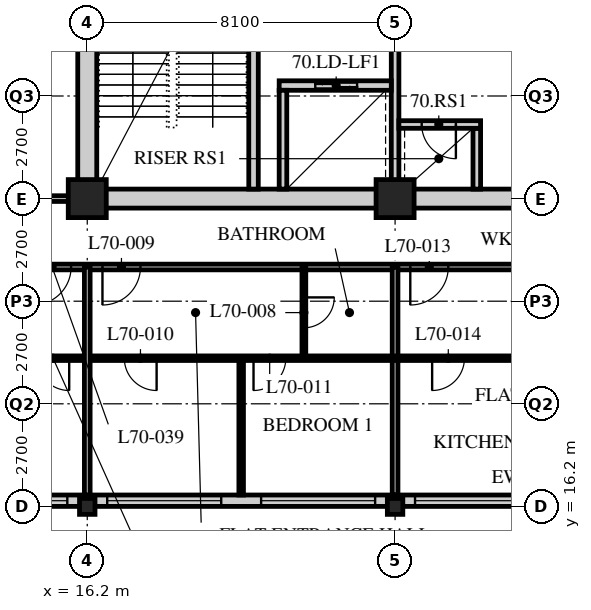
"""IFC4 building model, lengths in metres.
Left out: names, types, materials, properties, quantities, classifications, styles, units other than length and angle.
Written with IfcOpenShell. Run it as: python <this file> out.ifc"""

import sys

from ifc_helpers import new_model, si_unit, direction, frame, frame_2d, origin, origin_2d, place, context, subcontext, project, spatial, rectangle, hollow_rectangle, i_section, extrude, element, fill, save


model = new_model("IFC4")
c1 = context("Model", 3, precision=1e-05, world=origin(), true_north=direction((0.0, 1.0)))
c2 = subcontext(c1, "Body", "Model", "MODEL_VIEW")
j1 = project(units=[si_unit("LENGTHUNIT", "METRE"), si_unit("PLANEANGLEUNIT", "RADIAN")], contexts=[c1])
p1 = place(None, origin())
s1 = spatial("IfcSite", under=j1, at=p1, CompositionType="ELEMENT")
p2 = place(p1, origin())
s2 = spatial("IfcBuilding", under=s1, at=p2, CompositionType="ELEMENT")
p3 = place(p2, frame((0.0, 0.0, 273.6)))
s3 = spatial("IfcBuildingStorey", under=s2, at=p3, CompositionType="ELEMENT", Elevation=273.6)
p4 = place(p3, frame((16.2, 16.2, 0.0), z_axis=(0.0, 0.0, 1.0), x_axis=(1.0, 0.0, 0.0)))
e1 = element("IfcColumn", 1, at=p4, inside=s3, PredefinedType="COLUMN", context=c2, shape_type="SweptSolid", body=[
    extrude(i_section(OverallWidth=0.407, OverallDepth=0.419, WebThickness=0.031, FlangeThickness=0.049, FilletRadius=0.015, at=origin_2d()), origin(), (0.0, 0.0, 1.0), 3.9),
])
p5 = place(p3, frame((16.2, 24.3, 0.0), z_axis=(0.0, 0.0, 1.0), x_axis=(1.0, 0.0, 0.0)))
e2 = element("IfcColumn", 2, at=p5, inside=s3, PredefinedType="COLUMN", context=c2, shape_type="SweptSolid", body=[
    extrude(hollow_rectangle(XDim=1.0, YDim=1.0, WallThickness=0.1, at=origin_2d()), origin(), (0.0, 0.0, 1.0), 3.9),
])
p6 = place(p3, frame((24.3, 16.2, 0.0), z_axis=(0.0, 0.0, 1.0), x_axis=(1.0, 0.0, 0.0)))
e3 = element("IfcColumn", 3, at=p6, inside=s3, PredefinedType="COLUMN", context=c2, shape_type="SweptSolid", body=[
    extrude(i_section(OverallWidth=0.407, OverallDepth=0.419, WebThickness=0.031, FlangeThickness=0.049, FilletRadius=0.015, at=origin_2d()), origin(), (0.0, 0.0, 1.0), 3.9),
])
p7 = place(p3, frame((24.3, 24.3, 0.0), z_axis=(0.0, 0.0, 1.0), x_axis=(1.0, 0.0, 0.0)))
e4 = element("IfcColumn", 4, at=p7, inside=s3, PredefinedType="COLUMN", context=c2, shape_type="SweptSolid", body=[
    extrude(hollow_rectangle(XDim=1.0, YDim=1.0, WallThickness=0.1, at=origin_2d()), origin(), (0.0, 0.0, 1.0), 3.9),
])
p8 = place(p3, frame((8.4, 16.35, 0.0), z_axis=(0.0, 0.0, 1.0), x_axis=(1.0, 0.0, 0.0)))
e5 = element("IfcWall", 5, at=p8, inside=s3, PredefinedType="SOLIDWALL", context=c2, shape_type="SweptSolid", body=[
    extrude(rectangle(XDim=40.2, YDim=0.3, at=frame_2d((20.1, 0.0))), origin(), (0.0, 0.0, 1.0), 3.69),
])
p9 = place(p8, frame((0.225, 0.0, 0.6)))
e6 = element("IfcOpeningElement", 6, at=p9, cuts=e5, PredefinedType="OPENING", context=c2, shape_type="SweptSolid", body=[
    extrude(rectangle(XDim=3.0, YDim=2.4, at=frame_2d((1.5, 1.2))), frame((0.0, 0.16, 0.0), z_axis=(0.0, -1.0, 0.0), x_axis=(1.0, 0.0, 0.0)), (0.0, 0.0, 1.0), 0.32),
])
p10 = place(p8, frame((4.275, 0.0, 0.6)))
e7 = element("IfcOpeningElement", 7, at=p10, cuts=e5, PredefinedType="OPENING", context=c2, shape_type="SweptSolid", body=[
    extrude(rectangle(XDim=3.0, YDim=2.4, at=frame_2d((1.5, 1.2))), frame((0.0, 0.16, 0.0), z_axis=(0.0, -1.0, 0.0), x_axis=(1.0, 0.0, 0.0)), (0.0, 0.0, 1.0), 0.32),
])
p11 = place(p8, frame((8.325, 0.0, 0.6)))
e8 = element("IfcOpeningElement", 8, at=p11, cuts=e5, PredefinedType="OPENING", context=c2, shape_type="SweptSolid", body=[
    extrude(rectangle(XDim=3.0, YDim=2.4, at=frame_2d((1.5, 1.2))), frame((0.0, 0.16, 0.0), z_axis=(0.0, -1.0, 0.0), x_axis=(1.0, 0.0, 0.0)), (0.0, 0.0, 1.0), 0.32),
])
p12 = place(p8, frame((12.375, 0.0, 0.6)))
e9 = element("IfcOpeningElement", 9, at=p12, cuts=e5, PredefinedType="OPENING", context=c2, shape_type="SweptSolid", body=[
    extrude(rectangle(XDim=3.0, YDim=2.4, at=frame_2d((1.5, 1.2))), frame((0.0, 0.16, 0.0), z_axis=(0.0, -1.0, 0.0), x_axis=(1.0, 0.0, 0.0)), (0.0, 0.0, 1.0), 0.32),
])
p13 = place(p8, frame((16.425, 0.0, 0.6)))
e10 = element("IfcOpeningElement", 10, at=p13, cuts=e5, PredefinedType="OPENING", context=c2, shape_type="SweptSolid", body=[
    extrude(rectangle(XDim=3.0, YDim=2.4, at=frame_2d((1.5, 1.2))), frame((0.0, 0.16, 0.0), z_axis=(0.0, -1.0, 0.0), x_axis=(1.0, 0.0, 0.0)), (0.0, 0.0, 1.0), 0.32),
])
p14 = place(p8, frame((20.475, 0.0, 0.6)))
e11 = element("IfcOpeningElement", 11, at=p14, cuts=e5, PredefinedType="OPENING", context=c2, shape_type="SweptSolid", body=[
    extrude(rectangle(XDim=3.0, YDim=2.4, at=frame_2d((1.5, 1.2))), frame((0.0, 0.16, 0.0), z_axis=(0.0, -1.0, 0.0), x_axis=(1.0, 0.0, 0.0)), (0.0, 0.0, 1.0), 0.32),
])
p15 = place(p8, frame((24.525, 0.0, 0.6)))
e12 = element("IfcOpeningElement", 12, at=p15, cuts=e5, PredefinedType="OPENING", context=c2, shape_type="SweptSolid", body=[
    extrude(rectangle(XDim=3.0, YDim=2.4, at=frame_2d((1.5, 1.2))), frame((0.0, 0.16, 0.0), z_axis=(0.0, -1.0, 0.0), x_axis=(1.0, 0.0, 0.0)), (0.0, 0.0, 1.0), 0.32),
])
p16 = place(p8, frame((28.575, 0.0, 0.6)))
e13 = element("IfcOpeningElement", 13, at=p16, cuts=e5, PredefinedType="OPENING", context=c2, shape_type="SweptSolid", body=[
    extrude(rectangle(XDim=3.0, YDim=2.4, at=frame_2d((1.5, 1.2))), frame((0.0, 0.16, 0.0), z_axis=(0.0, -1.0, 0.0), x_axis=(1.0, 0.0, 0.0)), (0.0, 0.0, 1.0), 0.32),
])
p17 = place(p8, frame((32.625, 0.0, 0.6)))
e14 = element("IfcOpeningElement", 14, at=p17, cuts=e5, PredefinedType="OPENING", context=c2, shape_type="SweptSolid", body=[
    extrude(rectangle(XDim=3.0, YDim=2.4, at=frame_2d((1.5, 1.2))), frame((0.0, 0.16, 0.0), z_axis=(0.0, -1.0, 0.0), x_axis=(1.0, 0.0, 0.0)), (0.0, 0.0, 1.0), 0.32),
])
p18 = place(p8, frame((36.675, 0.0, 0.6)))
e15 = element("IfcOpeningElement", 15, at=p18, cuts=e5, PredefinedType="OPENING", context=c2, shape_type="SweptSolid", body=[
    extrude(rectangle(XDim=3.0, YDim=2.4, at=frame_2d((1.5, 1.2))), frame((0.0, 0.16, 0.0), z_axis=(0.0, -1.0, 0.0), x_axis=(1.0, 0.0, 0.0)), (0.0, 0.0, 1.0), 0.32),
])
p19 = place(p3, frame((12.15, 22.5, 0.0), z_axis=(0.0, 0.0, 1.0), x_axis=(1.0, 0.0, 0.0)))
e16 = element("IfcWall", 16, at=p19, inside=s3, PredefinedType="PARTITIONING", context=c2, shape_type="SweptSolid", body=[
    extrude(rectangle(XDim=24.3, YDim=0.15, at=frame_2d((12.15, 0.0))), origin(), (0.0, 0.0, 1.0), 3.69),
])
p20 = place(p19, frame((4.45, 0.0, 0.0)))
e17 = element("IfcOpeningElement", 17, at=p20, cuts=e16, PredefinedType="OPENING", context=c2, shape_type="SweptSolid", body=[
    extrude(rectangle(XDim=1.0, YDim=2.1, at=frame_2d((0.5, 1.05))), frame((0.0, 0.085, 0.0), z_axis=(0.0, -1.0, 0.0), x_axis=(1.0, 0.0, 0.0)), (0.0, 0.0, 1.0), 0.17),
])
p21 = place(p19, frame((12.55, 0.0, 0.0)))
e18 = element("IfcOpeningElement", 18, at=p21, cuts=e16, PredefinedType="OPENING", context=c2, shape_type="SweptSolid", body=[
    extrude(rectangle(XDim=1.0, YDim=2.1, at=frame_2d((0.5, 1.05))), frame((0.0, 0.085, 0.0), z_axis=(0.0, -1.0, 0.0), x_axis=(1.0, 0.0, 0.0)), (0.0, 0.0, 1.0), 0.17),
])
p22 = place(p19, frame((2.625, 0.0, 0.0)))
e19 = element("IfcOpeningElement", 19, at=p22, cuts=e16, PredefinedType="OPENING", context=c2, shape_type="SweptSolid", body=[
    extrude(rectangle(XDim=1.0, YDim=2.1, at=frame_2d((0.5, 1.05))), frame((0.0, 0.085, 0.0), z_axis=(0.0, -1.0, 0.0), x_axis=(1.0, 0.0, 0.0)), (0.0, 0.0, 1.0), 0.17),
])
p23 = place(p3, frame((16.0, 24.3, 0.0), z_axis=(0.0, 0.0, 1.0), x_axis=(-1.0, 0.0, 0.0)))
e20 = element("IfcWall", 20, at=p23, inside=s3, PredefinedType="PARTITIONING", context=c2, shape_type="SweptSolid", body=[
    extrude(rectangle(XDim=2.05, YDim=0.15, at=frame_2d((1.025, 0.0))), origin(), (0.0, 0.0, 1.0), 3.078),
])
p24 = place(p3, frame((21.9, 22.5, 0.0), z_axis=(0.0, 0.0, 1.0), x_axis=(0.0, -1.0, 0.0)))
e21 = element("IfcWall", 21, at=p24, inside=s3, PredefinedType="PARTITIONING", context=c2, shape_type="SweptSolid", body=[
    extrude(rectangle(XDim=2.4, YDim=0.1, at=frame_2d((1.2, 0.0))), origin(), (0.0, 0.0, 1.0), 3.69),
])
p25 = place(p24, frame((0.8, 0.0, 0.0)))
e22 = element("IfcOpeningElement", 22, at=p25, cuts=e21, PredefinedType="OPENING", context=c2, shape_type="SweptSolid", body=[
    extrude(rectangle(XDim=0.8, YDim=2.1, at=frame_2d((0.4, 1.05))), frame((0.0, 0.06, 0.0), z_axis=(0.0, -1.0, 0.0), x_axis=(1.0, 0.0, 0.0)), (0.0, 0.0, 1.0), 0.12),
])
p26 = place(p3, frame((20.25, 20.1, 0.0), z_axis=(0.0, 0.0, 1.0), x_axis=(0.0, -1.0, 0.0)))
e23 = element("IfcWall", 23, at=p26, inside=s3, PredefinedType="PARTITIONING", context=c2, shape_type="SweptSolid", body=[
    extrude(rectangle(XDim=3.6, YDim=0.12, at=frame_2d((1.8, 0.0))), origin(), (0.0, 0.0, 1.0), 3.69),
])
p27 = place(p3, frame((24.3, 22.5, 0.0), z_axis=(0.0, 0.0, 1.0), x_axis=(0.0, -1.0, 0.0)))
e24 = element("IfcWall", 24, at=p27, inside=s3, PredefinedType="PARTITIONING", context=c2, shape_type="SweptSolid", body=[
    extrude(rectangle(XDim=6.0, YDim=0.15, at=frame_2d((3.0, 0.0))), origin(), (0.0, 0.0, 1.0), 3.078),
])
p28 = place(p3, frame((12.15, 20.1, 0.0), z_axis=(0.0, 0.0, 1.0), x_axis=(1.0, 0.0, 0.0)))
e25 = element("IfcWall", 25, at=p28, inside=s3, PredefinedType="PARTITIONING", context=c2, shape_type="SweptSolid", body=[
    extrude(rectangle(XDim=24.3, YDim=0.12, at=frame_2d((12.15, 0.0))), origin(), (0.0, 0.0, 1.0), 3.69),
])
p29 = place(p28, frame((5.025, 0.0, 0.0)))
e26 = element("IfcOpeningElement", 26, at=p29, cuts=e25, PredefinedType="OPENING", context=c2, shape_type="SweptSolid", body=[
    extrude(rectangle(XDim=0.85, YDim=2.1, at=frame_2d((0.425, 1.05))), frame((0.0, 0.07, 0.0), z_axis=(0.0, -1.0, 0.0), x_axis=(1.0, 0.0, 0.0)), (0.0, 0.0, 1.0), 0.14),
])
p30 = place(p28, frame((8.425, 0.0, 0.0)))
e27 = element("IfcOpeningElement", 27, at=p30, cuts=e25, PredefinedType="OPENING", context=c2, shape_type="SweptSolid", body=[
    extrude(rectangle(XDim=0.85, YDim=2.1, at=frame_2d((0.425, 1.05))), frame((0.0, 0.07, 0.0), z_axis=(0.0, -1.0, 0.0), x_axis=(1.0, 0.0, 0.0)), (0.0, 0.0, 1.0), 0.14),
])
p31 = place(p28, frame((13.125, 0.0, 0.0)))
e28 = element("IfcOpeningElement", 28, at=p31, cuts=e25, PredefinedType="OPENING", context=c2, shape_type="SweptSolid", body=[
    extrude(rectangle(XDim=0.85, YDim=2.1, at=frame_2d((0.425, 1.05))), frame((0.0, 0.07, 0.0), z_axis=(0.0, -1.0, 0.0), x_axis=(1.0, 0.0, 0.0)), (0.0, 0.0, 1.0), 0.14),
])
p32 = place(p28, frame((20.575, 0.0, 0.0)))
e29 = element("IfcOpeningElement", 29, at=p32, cuts=e25, PredefinedType="OPENING", context=c2, shape_type="SweptSolid", body=[
    extrude(rectangle(XDim=0.85, YDim=2.1, at=frame_2d((0.425, 1.05))), frame((0.0, 0.07, 0.0), z_axis=(0.0, -1.0, 0.0), x_axis=(1.0, 0.0, 0.0)), (0.0, 0.0, 1.0), 0.14),
])
p33 = place(p28, frame((2.725, 0.0, 0.0)))
e30 = element("IfcOpeningElement", 30, at=p33, cuts=e25, PredefinedType="OPENING", context=c2, shape_type="SweptSolid", body=[
    extrude(rectangle(XDim=0.85, YDim=2.1, at=frame_2d((0.425, 1.05))), frame((0.0, 0.07, 0.0), z_axis=(0.0, -1.0, 0.0), x_axis=(1.0, 0.0, 0.0)), (0.0, 0.0, 1.0), 0.14),
])
p34 = place(p3, frame((16.2, 22.5, 0.0), z_axis=(0.0, 0.0, 1.0), x_axis=(0.0, -1.0, 0.0)))
e31 = element("IfcWall", 31, at=p34, inside=s3, PredefinedType="PARTITIONING", context=c2, shape_type="SweptSolid", body=[
    extrude(rectangle(XDim=6.0, YDim=0.15, at=frame_2d((3.0, 0.0))), origin(), (0.0, 0.0, 1.0), 3.078),
])
p35 = place(p3, frame((15.95, 24.3, 0.0), z_axis=(0.0, 0.0, 1.0), x_axis=(1.0, 0.0, 0.0)))
e32 = element("IfcWall", 32, at=p35, inside=s3, PredefinedType="SOLIDWALL", context=c2, shape_type="SweptSolid", body=[
    extrude(rectangle(XDim=24.55, YDim=0.5, at=frame_2d((12.275, 0.0))), origin(), (0.0, 0.0, 1.0), 3.04),
])
p36 = place(p35, frame((11.5, 0.0, 0.0)))
e33 = element("IfcOpeningElement", 33, at=p36, cuts=e32, PredefinedType="OPENING", context=c2, shape_type="SweptSolid", body=[
    extrude(rectangle(XDim=1.8, YDim=2.4, at=frame_2d((0.9, 1.2))), frame((0.0, 0.26, 0.0), z_axis=(0.0, -1.0, 0.0), x_axis=(1.0, 0.0, 0.0)), (0.0, 0.0, 1.0), 0.52),
])
p37 = place(p3, frame((16.2, 24.55, 0.0), z_axis=(0.0, 0.0, 1.0), x_axis=(0.0, 1.0, 0.0)))
e34 = element("IfcWall", 34, at=p37, inside=s3, PredefinedType="SOLIDWALL", context=c2, shape_type="SweptSolid", body=[
    extrude(rectangle(XDim=15.7, YDim=0.5, at=frame_2d((7.85, 0.0))), origin(), (0.0, 0.0, 1.0), 3.078),
])
p38 = place(p3, frame((24.3, 24.55, 0.0), z_axis=(0.0, 0.0, 1.0), x_axis=(0.0, 1.0, 0.0)))
e35 = element("IfcWall", 35, at=p38, inside=s3, PredefinedType="SOLIDWALL", context=c2, shape_type="SweptSolid", body=[
    extrude(rectangle(XDim=7.75, YDim=0.2, at=frame_2d((3.875, 0.0))), origin(), (0.0, 0.0, 1.0), 3.078),
])
p39 = place(p38, frame((4.6, 0.0, 0.0)))
e36 = element("IfcOpeningElement", 36, at=p39, cuts=e35, PredefinedType="OPENING", context=c2, shape_type="SweptSolid", body=[
    extrude(rectangle(XDim=1.2, YDim=2.1, at=frame_2d((0.6, 1.05))), frame((0.0, 0.11, 0.0), z_axis=(0.0, -1.0, 0.0), x_axis=(1.0, 0.0, 0.0)), (0.0, 0.0, 1.0), 0.22),
])
p40 = place(p3, frame((20.575, 24.55, 0.0), z_axis=(0.0, 0.0, 1.0), x_axis=(0.0, 1.0, 0.0)))
e37 = element("IfcWall", 37, at=p40, inside=s3, PredefinedType="SOLIDWALL", context=c2, shape_type="SweptSolid", body=[
    extrude(rectangle(XDim=7.75, YDim=0.25, at=frame_2d((3.875, 0.0))), origin(), (0.0, 0.0, 1.0), 3.69),
])
p41 = place(p40, frame((6.2, 0.0, 0.0)))
e38 = element("IfcOpeningElement", 38, at=p41, cuts=e37, PredefinedType="OPENING", context=c2, shape_type="SweptSolid", body=[
    extrude(rectangle(XDim=1.2, YDim=2.1, at=frame_2d((0.6, 1.05))), frame((0.0, 0.135, 0.0), z_axis=(0.0, -1.0, 0.0), x_axis=(1.0, 0.0, 0.0)), (0.0, 0.0, 1.0), 0.27),
])
p42 = place(p3, frame((21.25, 27.275, 0.0), z_axis=(0.0, 0.0, 1.0), x_axis=(1.0, 0.0, 0.0)))
e39 = element("IfcWall", 39, at=p42, inside=s3, PredefinedType="SOLIDWALL", context=c2, shape_type="SweptSolid", body=[
    extrude(rectangle(XDim=2.95, YDim=0.25, at=frame_2d((1.475, 0.0))), origin(), (0.0, 0.0, 1.0), 3.69),
])
p43 = place(p42, frame((0.95, 0.0, 0.0)))
e40 = element("IfcOpeningElement", 40, at=p43, cuts=e39, PredefinedType="OPENING", context=c2, shape_type="SweptSolid", body=[
    extrude(rectangle(XDim=1.1, YDim=2.4, at=frame_2d((0.55, 1.2))), frame((0.0, 0.135, 0.0), z_axis=(0.0, -1.0, 0.0), x_axis=(1.0, 0.0, 0.0)), (0.0, 0.0, 1.0), 0.27),
])
p44 = place(p3, frame((21.35, 24.55, 0.0), z_axis=(0.0, 0.0, 1.0), x_axis=(0.0, 1.0, 0.0)))
e41 = element("IfcWall", 41, at=p44, inside=s3, PredefinedType="SOLIDWALL", context=c2, shape_type="SweptSolid", body=[
    extrude(rectangle(XDim=2.6, YDim=0.2, at=frame_2d((1.3, 0.0))), origin(), (0.0, 0.0, 1.0), 3.69),
])
p45 = place(p3, frame((26.45, 24.55, 0.0), z_axis=(0.0, 0.0, 1.0), x_axis=(0.0, 1.0, 0.0)))
e42 = element("IfcWall", 42, at=p45, inside=s3, PredefinedType="SOLIDWALL", context=c2, shape_type="SweptSolid", body=[
    extrude(rectangle(XDim=1.6, YDim=0.2, at=frame_2d((0.8, 0.0))), origin(), (0.0, 0.0, 1.0), 3.69),
])
p46 = place(p3, frame((24.4, 26.25, 0.0), z_axis=(0.0, 0.0, 1.0), x_axis=(1.0, 0.0, 0.0)))
e43 = element("IfcWall", 43, at=p46, inside=s3, PredefinedType="SOLIDWALL", context=c2, shape_type="SweptSolid", body=[
    extrude(rectangle(XDim=2.15, YDim=0.2, at=frame_2d((1.075, 0.0))), origin(), (0.0, 0.0, 1.0), 3.69),
])
p47 = place(p46, frame((0.6, 0.0, 0.0)))
e44 = element("IfcOpeningElement", 44, at=p47, cuts=e43, PredefinedType="OPENING", context=c2, shape_type="SweptSolid", body=[
    extrude(rectangle(XDim=0.9, YDim=2.1, at=frame_2d((0.45, 1.05))), frame((0.0, 0.11, 0.0), z_axis=(0.0, -1.0, 0.0), x_axis=(1.0, 0.0, 0.0)), (0.0, 0.0, 1.0), 0.22),
])
p48 = place(p10, origin())
e45 = element("IfcWindow", 45, at=p48, inside=s3, PartitioningType="SINGLE_PANEL", PredefinedType="WINDOW", context=c2, shape_type="SweptSolid", body=[
    extrude(rectangle(XDim=3.0, YDim=2.4, at=frame_2d((1.5, 1.2))), frame((0.0, 0.03, 0.0), z_axis=(0.0, -1.0, 0.0), x_axis=(1.0, 0.0, 0.0)), (0.0, 0.0, 1.0), 0.06),
])
fill(e7, e45)
p49 = place(p11, origin())
e46 = element("IfcWindow", 46, at=p49, inside=s3, PartitioningType="SINGLE_PANEL", PredefinedType="WINDOW", context=c2, shape_type="SweptSolid", body=[
    extrude(rectangle(XDim=3.0, YDim=2.4, at=frame_2d((1.5, 1.2))), frame((0.0, 0.03, 0.0), z_axis=(0.0, -1.0, 0.0), x_axis=(1.0, 0.0, 0.0)), (0.0, 0.0, 1.0), 0.06),
])
fill(e8, e46)
p50 = place(p12, origin())
e47 = element("IfcWindow", 47, at=p50, inside=s3, PartitioningType="SINGLE_PANEL", PredefinedType="WINDOW", context=c2, shape_type="SweptSolid", body=[
    extrude(rectangle(XDim=3.0, YDim=2.4, at=frame_2d((1.5, 1.2))), frame((0.0, 0.03, 0.0), z_axis=(0.0, -1.0, 0.0), x_axis=(1.0, 0.0, 0.0)), (0.0, 0.0, 1.0), 0.06),
])
fill(e9, e47)
p51 = place(p13, origin())
e48 = element("IfcWindow", 48, at=p51, inside=s3, PartitioningType="SINGLE_PANEL", PredefinedType="WINDOW", context=c2, shape_type="SweptSolid", body=[
    extrude(rectangle(XDim=3.0, YDim=2.4, at=frame_2d((1.5, 1.2))), frame((0.0, 0.03, 0.0), z_axis=(0.0, -1.0, 0.0), x_axis=(1.0, 0.0, 0.0)), (0.0, 0.0, 1.0), 0.06),
])
fill(e10, e48)
p52 = place(p25, origin())
e49 = element("IfcDoor", 49, at=p52, inside=s3, OperationType="SINGLE_SWING_LEFT", PredefinedType="DOOR", context=c2, shape_type="SweptSolid", body=[
    extrude(rectangle(XDim=0.8, YDim=2.1, at=frame_2d((0.4, 1.05))), frame((0.0, 0.025, 0.0), z_axis=(0.0, -1.0, 0.0), x_axis=(1.0, 0.0, 0.0)), (0.0, 0.0, 1.0), 0.05),
])
fill(e22, e49)
p53 = place(p20, origin())
e50 = element("IfcDoor", 50, at=p53, inside=s3, OperationType="SINGLE_SWING_RIGHT", PredefinedType="DOOR", context=c2, shape_type="SweptSolid", body=[
    extrude(rectangle(XDim=1.0, YDim=2.1, at=frame_2d((0.5, 1.05))), frame((0.0, 0.025, 0.0), z_axis=(0.0, -1.0, 0.0), x_axis=(1.0, 0.0, 0.0)), (0.0, 0.0, 1.0), 0.05),
])
fill(e17, e50)
p54 = place(p29, origin())
e51 = element("IfcDoor", 51, at=p54, inside=s3, OperationType="SINGLE_SWING_LEFT", PredefinedType="DOOR", context=c2, shape_type="SweptSolid", body=[
    extrude(rectangle(XDim=0.85, YDim=2.1, at=frame_2d((0.425, 1.05))), frame((0.0, 0.025, 0.0), z_axis=(0.0, -1.0, 0.0), x_axis=(1.0, 0.0, 0.0)), (0.0, 0.0, 1.0), 0.05),
])
fill(e26, e51)
p55 = place(p30, origin())
e52 = element("IfcDoor", 52, at=p55, inside=s3, OperationType="SINGLE_SWING_RIGHT", PredefinedType="DOOR", context=c2, shape_type="SweptSolid", body=[
    extrude(rectangle(XDim=0.85, YDim=2.1, at=frame_2d((0.425, 1.05))), frame((0.0, 0.025, 0.0), z_axis=(0.0, -1.0, 0.0), x_axis=(1.0, 0.0, 0.0)), (0.0, 0.0, 1.0), 0.05),
])
fill(e27, e52)
p56 = place(p21, origin())
e53 = element("IfcDoor", 53, at=p56, inside=s3, OperationType="SINGLE_SWING_RIGHT", PredefinedType="DOOR", context=c2, shape_type="SweptSolid", body=[
    extrude(rectangle(XDim=1.0, YDim=2.1, at=frame_2d((0.5, 1.05))), frame((0.0, 0.025, 0.0), z_axis=(0.0, -1.0, 0.0), x_axis=(1.0, 0.0, 0.0)), (0.0, 0.0, 1.0), 0.05),
])
fill(e18, e53)
p57 = place(p31, origin())
e54 = element("IfcDoor", 54, at=p57, inside=s3, OperationType="SINGLE_SWING_RIGHT", PredefinedType="DOOR", context=c2, shape_type="SweptSolid", body=[
    extrude(rectangle(XDim=0.85, YDim=2.1, at=frame_2d((0.425, 1.05))), frame((0.0, 0.025, 0.0), z_axis=(0.0, -1.0, 0.0), x_axis=(1.0, 0.0, 0.0)), (0.0, 0.0, 1.0), 0.05),
])
fill(e28, e54)
p58 = place(p22, origin())
e55 = element("IfcDoor", 55, at=p58, inside=s3, OperationType="SINGLE_SWING_RIGHT", PredefinedType="DOOR", context=c2, shape_type="SweptSolid", body=[
    extrude(rectangle(XDim=1.0, YDim=2.1, at=frame_2d((0.5, 1.05))), frame((0.0, 0.025, 0.0), z_axis=(0.0, -1.0, 0.0), x_axis=(1.0, 0.0, 0.0)), (0.0, 0.0, 1.0), 0.05),
])
fill(e19, e55)
p59 = place(p33, origin())
e56 = element("IfcDoor", 56, at=p59, inside=s3, OperationType="SINGLE_SWING_LEFT", PredefinedType="DOOR", context=c2, shape_type="SweptSolid", body=[
    extrude(rectangle(XDim=0.85, YDim=2.1, at=frame_2d((0.425, 1.05))), frame((0.0, 0.025, 0.0), z_axis=(0.0, -1.0, 0.0), x_axis=(1.0, 0.0, 0.0)), (0.0, 0.0, 1.0), 0.05),
])
fill(e30, e56)
p60 = place(p47, origin())
e57 = element("IfcDoor", 57, at=p60, inside=s3, OperationType="SINGLE_SWING_LEFT", PredefinedType="DOOR", context=c2, shape_type="SweptSolid", body=[
    extrude(rectangle(XDim=0.9, YDim=2.1, at=frame_2d((0.45, 1.05))), frame((0.0, 0.025, 0.0), z_axis=(0.0, -1.0, 0.0), x_axis=(1.0, 0.0, 0.0)), (0.0, 0.0, 1.0), 0.05),
])
fill(e44, e57)
p61 = place(p43, origin())
e58 = element("IfcDoor", 58, at=p61, inside=s3, OperationType="DOUBLE_DOOR_SLIDING", PredefinedType="DOOR", context=c2, shape_type="SweptSolid", body=[
    extrude(rectangle(XDim=1.1, YDim=2.4, at=frame_2d((0.55, 1.2))), frame((0.0, 0.025, 0.0), z_axis=(0.0, -1.0, 0.0), x_axis=(1.0, 0.0, 0.0)), (0.0, 0.0, 1.0), 0.05),
])
fill(e40, e58)
save(model, sys.argv[1])
